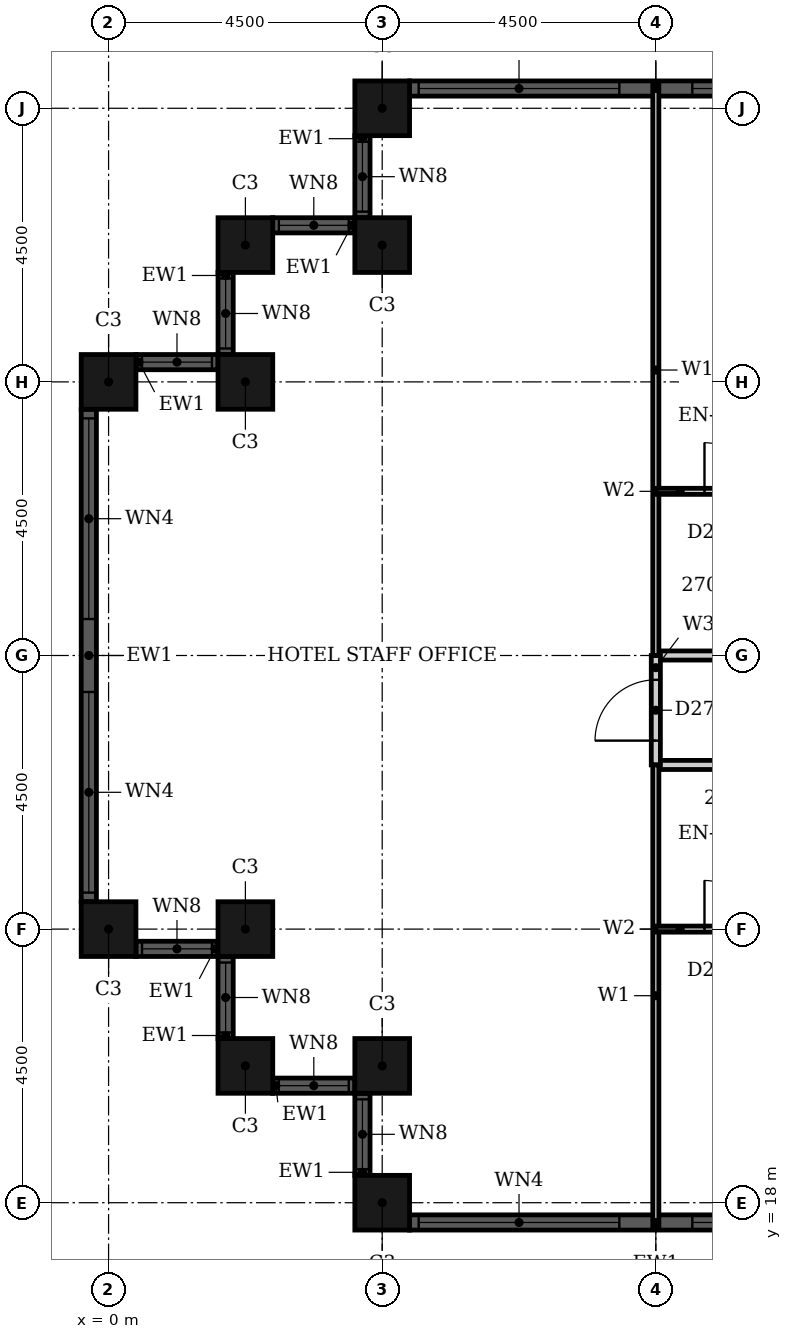
"""IFC4 building model, lengths in metres.
Left out: names, types, materials, properties, quantities, classifications, styles, units other than length and angle.
Written with IfcOpenShell. Run it as: python <this file> out.ifc"""

import sys

from ifc_helpers import new_model, si_unit, direction, frame, frame_2d, origin, origin_2d, place, context, subcontext, project, spatial, rectangle, hollow_rectangle, extrude, element, fill, save


model = new_model("IFC4")
c1 = context("Model", 3, precision=1e-05, world=origin(), true_north=direction((0.0, 1.0)))
c2 = subcontext(c1, "Body", "Model", "MODEL_VIEW")
j1 = project(units=[si_unit("LENGTHUNIT", "METRE"), si_unit("PLANEANGLEUNIT", "RADIAN")], contexts=[c1])
p1 = place(None, origin())
s1 = spatial("IfcSite", under=j1, at=p1, CompositionType="ELEMENT")
p2 = place(p1, origin())
s2 = spatial("IfcBuilding", under=s1, at=p2, CompositionType="ELEMENT")
p3 = place(p2, frame((0.0, 0.0, 111.6)))
s3 = spatial("IfcBuildingStorey", under=s2, at=p3, CompositionType="ELEMENT", Elevation=111.6)
for number, where, z_axis, x_axis in (
    (1, (4.5, 36.0, 0.0), (0.0, 0.0, 1.0), (1.0, 0.0, 0.0)),
    (2, (4.5, 33.75, 0.0), (0.0, 0.0, 1.0), (1.0, 0.0, 0.0)),
    (3, (2.25, 33.75, 0.0), (0.0, 0.0, 1.0), (1.0, 0.0, 0.0)),
    (4, (2.25, 31.5, 0.0), (0.0, 0.0, 1.0), (1.0, 0.0, 0.0)),
    (5, (0.0, 31.5, 0.0), (0.0, 0.0, 1.0), (1.0, 0.0, 0.0)),
    (6, (0.0, 22.5, 0.0), (0.0, 0.0, 1.0), (1.0, 0.0, 0.0)),
    (7, (2.25, 22.5, 0.0), (0.0, 0.0, 1.0), (1.0, 0.0, 0.0)),
    (8, (2.25, 20.25, 0.0), (0.0, 0.0, 1.0), (1.0, 0.0, 0.0)),
    (9, (4.5, 20.25, 0.0), (0.0, 0.0, 1.0), (1.0, 0.0, 0.0)),
    (10, (4.5, 18.0, 0.0), (0.0, 0.0, 1.0), (1.0, 0.0, 0.0)),
):
    element("IfcColumn", number, at=place(p3, frame(where, z_axis=z_axis, x_axis=x_axis)), inside=s3, PredefinedType="COLUMN", context=c2, shape_type="SweptSolid", body=[
        extrude(hollow_rectangle(XDim=0.9, YDim=0.9, WallThickness=0.028, at=origin_2d()), origin(), (0.0, 0.0, 1.0), 3.6),
    ])
p4 = place(p3, frame((13.05, 36.325, 0.0), z_axis=(0.0, 0.0, 1.0), x_axis=(-1.0, 0.0, 0.0)))
e11 = element("IfcWall", 11, at=p4, inside=s3, PredefinedType="SOLIDWALL", context=c2, shape_type="SweptSolid", body=[
    extrude(rectangle(XDim=8.1, YDim=0.25, at=frame_2d((4.05, 0.0))), origin(), (0.0, 0.0, 1.0), 3.6),
])
p5 = place(p4, frame((0.15, 0.0, 0.9)))
e12 = element("IfcOpeningElement", 12, at=p5, cuts=e11, PredefinedType="OPENING", context=c2, shape_type="SweptSolid", body=[
    extrude(rectangle(XDim=3.3, YDim=2.08, at=frame_2d((1.65, 1.04))), frame((0.0, 0.135, 0.0), z_axis=(0.0, -1.0, 0.0), x_axis=(1.0, 0.0, 0.0)), (0.0, 0.0, 1.0), 0.27),
])
p6 = place(p4, frame((4.65, 0.0, 0.9)))
e13 = element("IfcOpeningElement", 13, at=p6, cuts=e11, PredefinedType="OPENING", context=c2, shape_type="SweptSolid", body=[
    extrude(rectangle(XDim=3.3, YDim=2.08, at=frame_2d((1.65, 1.04))), frame((0.0, 0.135, 0.0), z_axis=(0.0, -1.0, 0.0), x_axis=(1.0, 0.0, 0.0)), (0.0, 0.0, 1.0), 0.27),
])
p7 = place(p3, frame((4.175, 35.55, 0.0), z_axis=(0.0, 0.0, 1.0), x_axis=(0.0, -1.0, 0.0)))
e14 = element("IfcWall", 14, at=p7, inside=s3, PredefinedType="SOLIDWALL", context=c2, shape_type="SweptSolid", body=[
    extrude(rectangle(XDim=1.35, YDim=0.25, at=frame_2d((0.675, 0.0))), origin(), (0.0, 0.0, 1.0), 3.6),
])
p8 = place(p7, frame((0.1, 0.0, 0.9)))
e15 = element("IfcOpeningElement", 15, at=p8, cuts=e14, PredefinedType="OPENING", context=c2, shape_type="SweptSolid", body=[
    extrude(rectangle(XDim=1.15, YDim=2.08, at=frame_2d((0.575, 1.04))), frame((0.0, 0.135, 0.0), z_axis=(0.0, -1.0, 0.0), x_axis=(1.0, 0.0, 0.0)), (0.0, 0.0, 1.0), 0.27),
])
p9 = place(p3, frame((4.05, 34.075, 0.0), z_axis=(0.0, 0.0, 1.0), x_axis=(-1.0, 0.0, 0.0)))
e16 = element("IfcWall", 16, at=p9, inside=s3, PredefinedType="SOLIDWALL", context=c2, shape_type="SweptSolid", body=[
    extrude(rectangle(XDim=1.35, YDim=0.25, at=frame_2d((0.675, 0.0))), origin(), (0.0, 0.0, 1.0), 3.6),
])
p10 = place(p9, frame((0.1, 0.0, 0.9)))
e17 = element("IfcOpeningElement", 17, at=p10, cuts=e16, PredefinedType="OPENING", context=c2, shape_type="SweptSolid", body=[
    extrude(rectangle(XDim=1.15, YDim=2.08, at=frame_2d((0.575, 1.04))), frame((0.0, 0.135, 0.0), z_axis=(0.0, -1.0, 0.0), x_axis=(1.0, 0.0, 0.0)), (0.0, 0.0, 1.0), 0.27),
])
p11 = place(p3, frame((1.925, 33.3, 0.0), z_axis=(0.0, 0.0, 1.0), x_axis=(0.0, -1.0, 0.0)))
e18 = element("IfcWall", 18, at=p11, inside=s3, PredefinedType="SOLIDWALL", context=c2, shape_type="SweptSolid", body=[
    extrude(rectangle(XDim=1.35, YDim=0.25, at=frame_2d((0.675, 0.0))), origin(), (0.0, 0.0, 1.0), 3.6),
])
p12 = place(p11, frame((0.1, 0.0, 0.9)))
e19 = element("IfcOpeningElement", 19, at=p12, cuts=e18, PredefinedType="OPENING", context=c2, shape_type="SweptSolid", body=[
    extrude(rectangle(XDim=1.15, YDim=2.08, at=frame_2d((0.575, 1.04))), frame((0.0, 0.135, 0.0), z_axis=(0.0, -1.0, 0.0), x_axis=(1.0, 0.0, 0.0)), (0.0, 0.0, 1.0), 0.27),
])
p13 = place(p3, frame((1.8, 31.825, 0.0), z_axis=(0.0, 0.0, 1.0), x_axis=(-1.0, 0.0, 0.0)))
e20 = element("IfcWall", 20, at=p13, inside=s3, PredefinedType="SOLIDWALL", context=c2, shape_type="SweptSolid", body=[
    extrude(rectangle(XDim=1.35, YDim=0.25, at=frame_2d((0.675, 0.0))), origin(), (0.0, 0.0, 1.0), 3.6),
])
p14 = place(p13, frame((0.1, 0.0, 0.9)))
e21 = element("IfcOpeningElement", 21, at=p14, cuts=e20, PredefinedType="OPENING", context=c2, shape_type="SweptSolid", body=[
    extrude(rectangle(XDim=1.15, YDim=2.08, at=frame_2d((0.575, 1.04))), frame((0.0, 0.135, 0.0), z_axis=(0.0, -1.0, 0.0), x_axis=(1.0, 0.0, 0.0)), (0.0, 0.0, 1.0), 0.27),
])
p15 = place(p3, frame((-0.325, 31.05, 0.0), z_axis=(0.0, 0.0, 1.0), x_axis=(0.0, -1.0, 0.0)))
e22 = element("IfcWall", 22, at=p15, inside=s3, PredefinedType="SOLIDWALL", context=c2, shape_type="SweptSolid", body=[
    extrude(rectangle(XDim=8.1, YDim=0.25, at=frame_2d((4.05, 0.0))), origin(), (0.0, 0.0, 1.0), 3.6),
])
p16 = place(p15, frame((0.15, 0.0, 0.9)))
e23 = element("IfcOpeningElement", 23, at=p16, cuts=e22, PredefinedType="OPENING", context=c2, shape_type="SweptSolid", body=[
    extrude(rectangle(XDim=3.3, YDim=2.08, at=frame_2d((1.65, 1.04))), frame((0.0, 0.135, 0.0), z_axis=(0.0, -1.0, 0.0), x_axis=(1.0, 0.0, 0.0)), (0.0, 0.0, 1.0), 0.27),
])
p17 = place(p15, frame((4.65, 0.0, 0.9)))
e24 = element("IfcOpeningElement", 24, at=p17, cuts=e22, PredefinedType="OPENING", context=c2, shape_type="SweptSolid", body=[
    extrude(rectangle(XDim=3.3, YDim=2.08, at=frame_2d((1.65, 1.04))), frame((0.0, 0.135, 0.0), z_axis=(0.0, -1.0, 0.0), x_axis=(1.0, 0.0, 0.0)), (0.0, 0.0, 1.0), 0.27),
])
p18 = place(p3, frame((0.45, 22.175, 0.0), z_axis=(0.0, 0.0, 1.0), x_axis=(1.0, 0.0, 0.0)))
e25 = element("IfcWall", 25, at=p18, inside=s3, PredefinedType="SOLIDWALL", context=c2, shape_type="SweptSolid", body=[
    extrude(rectangle(XDim=1.35, YDim=0.25, at=frame_2d((0.675, 0.0))), origin(), (0.0, 0.0, 1.0), 3.6),
])
p19 = place(p18, frame((0.1, 0.0, 0.9)))
e26 = element("IfcOpeningElement", 26, at=p19, cuts=e25, PredefinedType="OPENING", context=c2, shape_type="SweptSolid", body=[
    extrude(rectangle(XDim=1.15, YDim=2.08, at=frame_2d((0.575, 1.04))), frame((0.0, 0.135, 0.0), z_axis=(0.0, -1.0, 0.0), x_axis=(1.0, 0.0, 0.0)), (0.0, 0.0, 1.0), 0.27),
])
p20 = place(p3, frame((1.925, 22.05, 0.0), z_axis=(0.0, 0.0, 1.0), x_axis=(0.0, -1.0, 0.0)))
e27 = element("IfcWall", 27, at=p20, inside=s3, PredefinedType="SOLIDWALL", context=c2, shape_type="SweptSolid", body=[
    extrude(rectangle(XDim=1.35, YDim=0.25, at=frame_2d((0.675, 0.0))), origin(), (0.0, 0.0, 1.0), 3.6),
])
p21 = place(p20, frame((0.1, 0.0, 0.9)))
e28 = element("IfcOpeningElement", 28, at=p21, cuts=e27, PredefinedType="OPENING", context=c2, shape_type="SweptSolid", body=[
    extrude(rectangle(XDim=1.15, YDim=2.08, at=frame_2d((0.575, 1.04))), frame((0.0, 0.135, 0.0), z_axis=(0.0, -1.0, 0.0), x_axis=(1.0, 0.0, 0.0)), (0.0, 0.0, 1.0), 0.27),
])
p22 = place(p3, frame((2.7, 19.925, 0.0), z_axis=(0.0, 0.0, 1.0), x_axis=(1.0, 0.0, 0.0)))
e29 = element("IfcWall", 29, at=p22, inside=s3, PredefinedType="SOLIDWALL", context=c2, shape_type="SweptSolid", body=[
    extrude(rectangle(XDim=1.35, YDim=0.25, at=frame_2d((0.675, 0.0))), origin(), (0.0, 0.0, 1.0), 3.6),
])
p23 = place(p22, frame((0.1, 0.0, 0.9)))
e30 = element("IfcOpeningElement", 30, at=p23, cuts=e29, PredefinedType="OPENING", context=c2, shape_type="SweptSolid", body=[
    extrude(rectangle(XDim=1.15, YDim=2.08, at=frame_2d((0.575, 1.04))), frame((0.0, 0.135, 0.0), z_axis=(0.0, -1.0, 0.0), x_axis=(1.0, 0.0, 0.0)), (0.0, 0.0, 1.0), 0.27),
])
p24 = place(p3, frame((4.175, 19.8, 0.0), z_axis=(0.0, 0.0, 1.0), x_axis=(0.0, -1.0, 0.0)))
e31 = element("IfcWall", 31, at=p24, inside=s3, PredefinedType="SOLIDWALL", context=c2, shape_type="SweptSolid", body=[
    extrude(rectangle(XDim=1.35, YDim=0.25, at=frame_2d((0.675, 0.0))), origin(), (0.0, 0.0, 1.0), 3.6),
])
p25 = place(p24, frame((0.1, 0.0, 0.9)))
e32 = element("IfcOpeningElement", 32, at=p25, cuts=e31, PredefinedType="OPENING", context=c2, shape_type="SweptSolid", body=[
    extrude(rectangle(XDim=1.15, YDim=2.08, at=frame_2d((0.575, 1.04))), frame((0.0, 0.135, 0.0), z_axis=(0.0, -1.0, 0.0), x_axis=(1.0, 0.0, 0.0)), (0.0, 0.0, 1.0), 0.27),
])
p26 = place(p3, frame((4.95, 17.675, 0.0), z_axis=(0.0, 0.0, 1.0), x_axis=(1.0, 0.0, 0.0)))
e33 = element("IfcWall", 33, at=p26, inside=s3, PredefinedType="SOLIDWALL", context=c2, shape_type="SweptSolid", body=[
    extrude(rectangle(XDim=8.1, YDim=0.25, at=frame_2d((4.05, 0.0))), origin(), (0.0, 0.0, 1.0), 3.6),
])
p27 = place(p26, frame((0.15, 0.0, 0.9)))
e34 = element("IfcOpeningElement", 34, at=p27, cuts=e33, PredefinedType="OPENING", context=c2, shape_type="SweptSolid", body=[
    extrude(rectangle(XDim=3.3, YDim=2.08, at=frame_2d((1.65, 1.04))), frame((0.0, 0.135, 0.0), z_axis=(0.0, -1.0, 0.0), x_axis=(1.0, 0.0, 0.0)), (0.0, 0.0, 1.0), 0.27),
])
p28 = place(p26, frame((4.65, 0.0, 0.9)))
e35 = element("IfcOpeningElement", 35, at=p28, cuts=e33, PredefinedType="OPENING", context=c2, shape_type="SweptSolid", body=[
    extrude(rectangle(XDim=3.3, YDim=2.08, at=frame_2d((1.65, 1.04))), frame((0.0, 0.135, 0.0), z_axis=(0.0, -1.0, 0.0), x_axis=(1.0, 0.0, 0.0)), (0.0, 0.0, 1.0), 0.27),
])
p29 = place(p3, frame((9.0, 25.2, 0.0), z_axis=(0.0, 0.0, 1.0), x_axis=(1.0, 0.0, 0.0)))
e36 = element("IfcWall", 36, at=p29, inside=s3, PredefinedType="PARTITIONING", context=c2, shape_type="SweptSolid", body=[
    extrude(rectangle(XDim=7.2, YDim=0.15, at=frame_2d((3.6, 0.0))), origin(), (0.0, 0.0, 1.0), 3.3),
])
p30 = place(p29, frame((2.95, 0.0, 0.0)))
e37 = element("IfcOpeningElement", 37, at=p30, cuts=e36, PredefinedType="OPENING", context=c2, shape_type="SweptSolid", body=[
    extrude(rectangle(XDim=1.0, YDim=2.1, at=frame_2d((0.5, 1.05))), frame((0.0, 0.085, 0.0), z_axis=(0.0, -1.0, 0.0), x_axis=(1.0, 0.0, 0.0)), (0.0, 0.0, 1.0), 0.17),
])
p31 = place(p3, frame((9.0, 27.0, 0.0), z_axis=(0.0, 0.0, 1.0), x_axis=(1.0, 0.0, 0.0)))
e38 = element("IfcWall", 38, at=p31, inside=s3, PredefinedType="PARTITIONING", context=c2, shape_type="SweptSolid", body=[
    extrude(rectangle(XDim=7.2, YDim=0.15, at=frame_2d((3.6, 0.0))), origin(), (0.0, 0.0, 1.0), 2.58),
])
p32 = place(p31, frame((2.95, 0.0, 0.0)))
e39 = element("IfcOpeningElement", 39, at=p32, cuts=e38, PredefinedType="OPENING", context=c2, shape_type="SweptSolid", body=[
    extrude(rectangle(XDim=1.0, YDim=2.1, at=frame_2d((0.5, 1.05))), frame((0.0, 0.085, 0.0), z_axis=(0.0, -1.0, 0.0), x_axis=(1.0, 0.0, 0.0)), (0.0, 0.0, 1.0), 0.17),
])
p33 = place(p3, frame((9.0, 25.2, 0.0), z_axis=(0.0, 0.0, 1.0), x_axis=(0.0, 1.0, 0.0)))
e40 = element("IfcWall", 40, at=p33, inside=s3, PredefinedType="PARTITIONING", context=c2, shape_type="SweptSolid", body=[
    extrude(rectangle(XDim=1.8, YDim=0.15, at=frame_2d((0.9, 0.0))), origin(), (0.0, 0.0, 1.0), 3.3),
])
p34 = place(p33, frame((0.4, 0.0, 0.0)))
e41 = element("IfcOpeningElement", 41, at=p34, cuts=e40, PredefinedType="OPENING", context=c2, shape_type="SweptSolid", body=[
    extrude(rectangle(XDim=1.0, YDim=2.1, at=frame_2d((0.5, 1.05))), frame((0.0, 0.085, 0.0), z_axis=(0.0, -1.0, 0.0), x_axis=(1.0, 0.0, 0.0)), (0.0, 0.0, 1.0), 0.17),
])
p35 = place(p3, frame((9.0, 27.0, 0.0), z_axis=(0.0, 0.0, 1.0), x_axis=(0.0, 1.0, 0.0)))
e42 = element("IfcWall", 42, at=p35, inside=s3, PredefinedType="PARTITIONING", context=c2, shape_type="SweptSolid", body=[
    extrude(rectangle(XDim=9.39, YDim=0.1, at=frame_2d((4.695, 0.0))), origin(), (0.0, 0.0, 1.0), 3.3),
])
p36 = place(p3, frame((9.0, 17.61, 0.0), z_axis=(0.0, 0.0, 1.0), x_axis=(0.0, 1.0, 0.0)))
e43 = element("IfcWall", 43, at=p36, inside=s3, PredefinedType="PARTITIONING", context=c2, shape_type="SweptSolid", body=[
    extrude(rectangle(XDim=7.59, YDim=0.1, at=frame_2d((3.795, 0.0))), origin(), (0.0, 0.0, 1.0), 3.3),
])
p37 = place(p3, frame((9.0, 22.5, 0.0), z_axis=(0.0, 0.0, 1.0), x_axis=(1.0, 0.0, 0.0)))
e44 = element("IfcWall", 44, at=p37, inside=s3, PredefinedType="PARTITIONING", context=c2, shape_type="SweptSolid", body=[
    extrude(rectangle(XDim=2.4, YDim=0.1, at=frame_2d((1.2, 0.0))), origin(), (0.0, 0.0, 1.0), 2.58),
])
p38 = place(p37, frame((0.8, 0.0, 0.0)))
e45 = element("IfcOpeningElement", 45, at=p38, cuts=e44, PredefinedType="OPENING", context=c2, shape_type="SweptSolid", body=[
    extrude(rectangle(XDim=0.8, YDim=2.1, at=frame_2d((0.4, 1.05))), frame((0.0, 0.06, 0.0), z_axis=(0.0, -1.0, 0.0), x_axis=(1.0, 0.0, 0.0)), (0.0, 0.0, 1.0), 0.12),
])
p39 = place(p3, frame((9.0, 29.7, 0.0), z_axis=(0.0, 0.0, 1.0), x_axis=(1.0, 0.0, 0.0)))
e46 = element("IfcWall", 46, at=p39, inside=s3, PredefinedType="PARTITIONING", context=c2, shape_type="SweptSolid", body=[
    extrude(rectangle(XDim=2.4, YDim=0.1, at=frame_2d((1.2, 0.0))), origin(), (0.0, 0.0, 1.0), 3.3),
])
p40 = place(p39, frame((0.8, 0.0, 0.0)))
e47 = element("IfcOpeningElement", 47, at=p40, cuts=e46, PredefinedType="OPENING", context=c2, shape_type="SweptSolid", body=[
    extrude(rectangle(XDim=0.8, YDim=2.1, at=frame_2d((0.4, 1.05))), frame((0.0, 0.06, 0.0), z_axis=(0.0, -1.0, 0.0), x_axis=(1.0, 0.0, 0.0)), (0.0, 0.0, 1.0), 0.12),
])
p41 = place(p5, origin())
e48 = element("IfcWindow", 48, at=p41, inside=s3, PartitioningType="SINGLE_PANEL", PredefinedType="WINDOW", context=c2, shape_type="SweptSolid", body=[
    extrude(rectangle(XDim=3.3, YDim=2.08, at=frame_2d((1.65, 1.04))), frame((0.0, 0.03, 0.0), z_axis=(0.0, -1.0, 0.0), x_axis=(1.0, 0.0, 0.0)), (0.0, 0.0, 1.0), 0.06),
])
fill(e12, e48)
p42 = place(p6, origin())
e49 = element("IfcWindow", 49, at=p42, inside=s3, PartitioningType="SINGLE_PANEL", PredefinedType="WINDOW", context=c2, shape_type="SweptSolid", body=[
    extrude(rectangle(XDim=3.3, YDim=2.08, at=frame_2d((1.65, 1.04))), frame((0.0, 0.03, 0.0), z_axis=(0.0, -1.0, 0.0), x_axis=(1.0, 0.0, 0.0)), (0.0, 0.0, 1.0), 0.06),
])
fill(e13, e49)
p43 = place(p8, origin())
e50 = element("IfcWindow", 50, at=p43, inside=s3, PartitioningType="SINGLE_PANEL", PredefinedType="WINDOW", context=c2, shape_type="SweptSolid", body=[
    extrude(rectangle(XDim=1.15, YDim=2.08, at=frame_2d((0.575, 1.04))), frame((0.0, 0.03, 0.0), z_axis=(0.0, -1.0, 0.0), x_axis=(1.0, 0.0, 0.0)), (0.0, 0.0, 1.0), 0.06),
])
fill(e15, e50)
p44 = place(p10, origin())
e51 = element("IfcWindow", 51, at=p44, inside=s3, PartitioningType="SINGLE_PANEL", PredefinedType="WINDOW", context=c2, shape_type="SweptSolid", body=[
    extrude(rectangle(XDim=1.15, YDim=2.08, at=frame_2d((0.575, 1.04))), frame((0.0, 0.03, 0.0), z_axis=(0.0, -1.0, 0.0), x_axis=(1.0, 0.0, 0.0)), (0.0, 0.0, 1.0), 0.06),
])
fill(e17, e51)
p45 = place(p12, origin())
e52 = element("IfcWindow", 52, at=p45, inside=s3, PartitioningType="SINGLE_PANEL", PredefinedType="WINDOW", context=c2, shape_type="SweptSolid", body=[
    extrude(rectangle(XDim=1.15, YDim=2.08, at=frame_2d((0.575, 1.04))), frame((0.0, 0.03, 0.0), z_axis=(0.0, -1.0, 0.0), x_axis=(1.0, 0.0, 0.0)), (0.0, 0.0, 1.0), 0.06),
])
fill(e19, e52)
p46 = place(p14, origin())
e53 = element("IfcWindow", 53, at=p46, inside=s3, PartitioningType="SINGLE_PANEL", PredefinedType="WINDOW", context=c2, shape_type="SweptSolid", body=[
    extrude(rectangle(XDim=1.15, YDim=2.08, at=frame_2d((0.575, 1.04))), frame((0.0, 0.03, 0.0), z_axis=(0.0, -1.0, 0.0), x_axis=(1.0, 0.0, 0.0)), (0.0, 0.0, 1.0), 0.06),
])
fill(e21, e53)
p47 = place(p16, origin())
e54 = element("IfcWindow", 54, at=p47, inside=s3, PartitioningType="SINGLE_PANEL", PredefinedType="WINDOW", context=c2, shape_type="SweptSolid", body=[
    extrude(rectangle(XDim=3.3, YDim=2.08, at=frame_2d((1.65, 1.04))), frame((0.0, 0.03, 0.0), z_axis=(0.0, -1.0, 0.0), x_axis=(1.0, 0.0, 0.0)), (0.0, 0.0, 1.0), 0.06),
])
fill(e23, e54)
p48 = place(p17, origin())
e55 = element("IfcWindow", 55, at=p48, inside=s3, PartitioningType="SINGLE_PANEL", PredefinedType="WINDOW", context=c2, shape_type="SweptSolid", body=[
    extrude(rectangle(XDim=3.3, YDim=2.08, at=frame_2d((1.65, 1.04))), frame((0.0, 0.03, 0.0), z_axis=(0.0, -1.0, 0.0), x_axis=(1.0, 0.0, 0.0)), (0.0, 0.0, 1.0), 0.06),
])
fill(e24, e55)
p49 = place(p19, origin())
e56 = element("IfcWindow", 56, at=p49, inside=s3, PartitioningType="SINGLE_PANEL", PredefinedType="WINDOW", context=c2, shape_type="SweptSolid", body=[
    extrude(rectangle(XDim=1.15, YDim=2.08, at=frame_2d((0.575, 1.04))), frame((0.0, 0.03, 0.0), z_axis=(0.0, -1.0, 0.0), x_axis=(1.0, 0.0, 0.0)), (0.0, 0.0, 1.0), 0.06),
])
fill(e26, e56)
p50 = place(p21, origin())
e57 = element("IfcWindow", 57, at=p50, inside=s3, PartitioningType="SINGLE_PANEL", PredefinedType="WINDOW", context=c2, shape_type="SweptSolid", body=[
    extrude(rectangle(XDim=1.15, YDim=2.08, at=frame_2d((0.575, 1.04))), frame((0.0, 0.03, 0.0), z_axis=(0.0, -1.0, 0.0), x_axis=(1.0, 0.0, 0.0)), (0.0, 0.0, 1.0), 0.06),
])
fill(e28, e57)
p51 = place(p23, origin())
e58 = element("IfcWindow", 58, at=p51, inside=s3, PartitioningType="SINGLE_PANEL", PredefinedType="WINDOW", context=c2, shape_type="SweptSolid", body=[
    extrude(rectangle(XDim=1.15, YDim=2.08, at=frame_2d((0.575, 1.04))), frame((0.0, 0.03, 0.0), z_axis=(0.0, -1.0, 0.0), x_axis=(1.0, 0.0, 0.0)), (0.0, 0.0, 1.0), 0.06),
])
fill(e30, e58)
p52 = place(p25, origin())
e59 = element("IfcWindow", 59, at=p52, inside=s3, PartitioningType="SINGLE_PANEL", PredefinedType="WINDOW", context=c2, shape_type="SweptSolid", body=[
    extrude(rectangle(XDim=1.15, YDim=2.08, at=frame_2d((0.575, 1.04))), frame((0.0, 0.03, 0.0), z_axis=(0.0, -1.0, 0.0), x_axis=(1.0, 0.0, 0.0)), (0.0, 0.0, 1.0), 0.06),
])
fill(e32, e59)
p53 = place(p27, origin())
e60 = element("IfcWindow", 60, at=p53, inside=s3, PartitioningType="SINGLE_PANEL", PredefinedType="WINDOW", context=c2, shape_type="SweptSolid", body=[
    extrude(rectangle(XDim=3.3, YDim=2.08, at=frame_2d((1.65, 1.04))), frame((0.0, 0.03, 0.0), z_axis=(0.0, -1.0, 0.0), x_axis=(1.0, 0.0, 0.0)), (0.0, 0.0, 1.0), 0.06),
])
fill(e34, e60)
p54 = place(p28, origin())
e61 = element("IfcWindow", 61, at=p54, inside=s3, PartitioningType="SINGLE_PANEL", PredefinedType="WINDOW", context=c2, shape_type="SweptSolid", body=[
    extrude(rectangle(XDim=3.3, YDim=2.08, at=frame_2d((1.65, 1.04))), frame((0.0, 0.03, 0.0), z_axis=(0.0, -1.0, 0.0), x_axis=(1.0, 0.0, 0.0)), (0.0, 0.0, 1.0), 0.06),
])
fill(e35, e61)
p55 = place(p38, origin())
e62 = element("IfcDoor", 62, at=p55, inside=s3, OperationType="SINGLE_SWING_RIGHT", PredefinedType="DOOR", context=c2, shape_type="SweptSolid", body=[
    extrude(rectangle(XDim=0.8, YDim=2.1, at=frame_2d((0.4, 1.05))), frame((0.0, 0.025, 0.0), z_axis=(0.0, -1.0, 0.0), x_axis=(1.0, 0.0, 0.0)), (0.0, 0.0, 1.0), 0.05),
])
fill(e45, e62)
p56 = place(p40, origin())
e63 = element("IfcDoor", 63, at=p56, inside=s3, OperationType="SINGLE_SWING_LEFT", PredefinedType="DOOR", context=c2, shape_type="SweptSolid", body=[
    extrude(rectangle(XDim=0.8, YDim=2.1, at=frame_2d((0.4, 1.05))), frame((0.0, 0.025, 0.0), z_axis=(0.0, -1.0, 0.0), x_axis=(1.0, 0.0, 0.0)), (0.0, 0.0, 1.0), 0.05),
])
fill(e47, e63)
p57 = place(p34, origin())
e64 = element("IfcDoor", 64, at=p57, inside=s3, OperationType="SINGLE_SWING_RIGHT", PredefinedType="DOOR", context=c2, shape_type="SweptSolid", body=[
    extrude(rectangle(XDim=1.0, YDim=2.1, at=frame_2d((0.5, 1.05))), frame((0.0, 0.025, 0.0), z_axis=(0.0, -1.0, 0.0), x_axis=(1.0, 0.0, 0.0)), (0.0, 0.0, 1.0), 0.05),
])
fill(e41, e64)
save(model, sys.argv[1])
